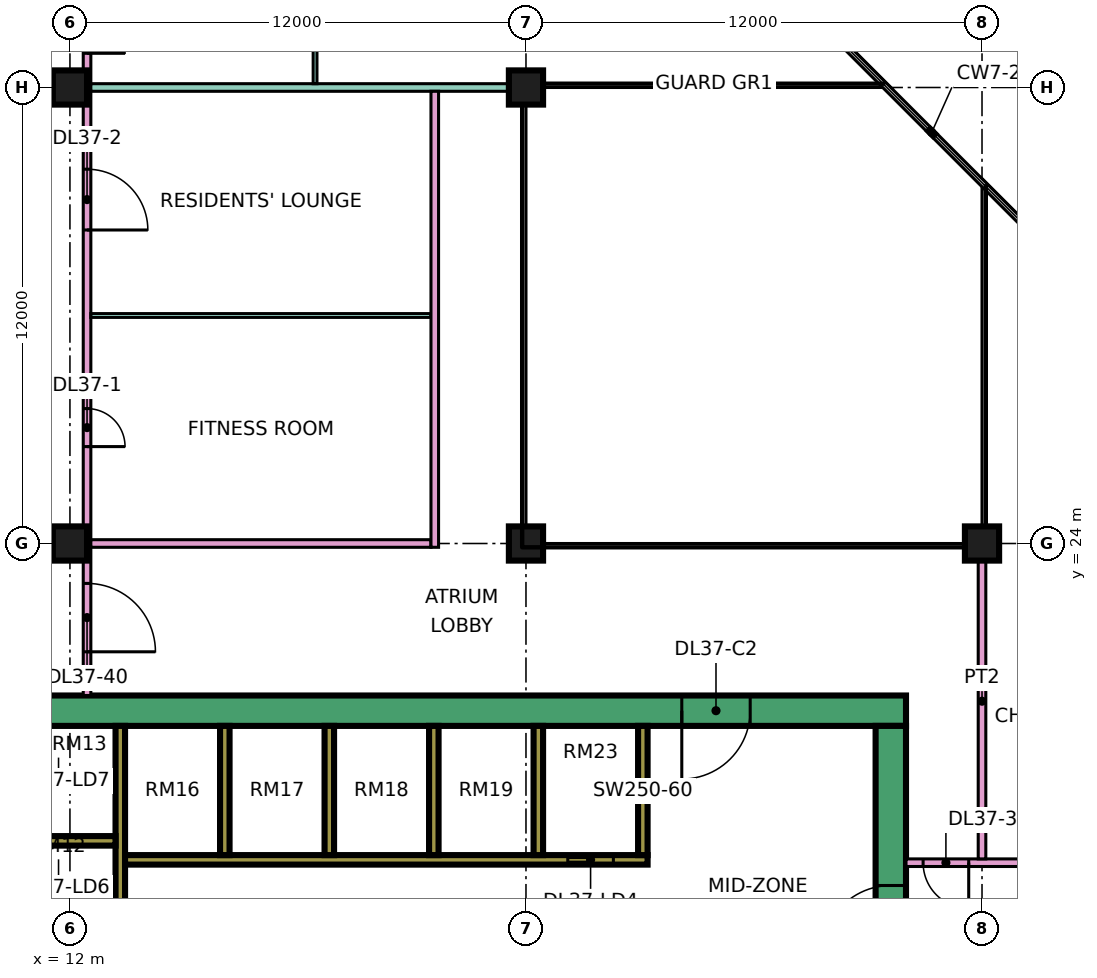
"""IFC4 building model, lengths in metres.
Left out: names, types, materials, properties, quantities, classifications, styles, units other than length and angle.
Written with IfcOpenShell. Run it as: python <this file> out.ifc"""

import sys

from ifc_helpers import new_model, si_unit, direction, frame, frame_2d, origin, origin_2d, place, context, subcontext, project, spatial, rectangle, extrude, element, fill, save


model = new_model("IFC4")
c1 = context("Model", 3, precision=1e-05, world=origin(), true_north=direction((0.0, 1.0)))
c2 = subcontext(c1, "Body", "Model", "MODEL_VIEW")
j1 = project(units=[si_unit("LENGTHUNIT", "METRE"), si_unit("PLANEANGLEUNIT", "RADIAN")], contexts=[c1])
p1 = place(None, origin())
s1 = spatial("IfcSite", under=j1, at=p1, CompositionType="ELEMENT")
p2 = place(p1, origin())
s2 = spatial("IfcBuilding", under=s1, at=p2, CompositionType="ELEMENT")
p3 = place(p2, frame((0.0, 0.0, 164.9)))
s3 = spatial("IfcBuildingStorey", under=s2, at=p3, CompositionType="ELEMENT", Elevation=164.9)
for number, where, z_axis, x_axis in (
    (1, (12.0, 24.0, 0.0), (0.0, 0.0, 1.0), (1.0, 0.0, 0.0)),
    (2, (12.0, 36.0, 0.0), (0.0, 0.0, 1.0), (1.0, 0.0, 0.0)),
    (3, (24.0, 24.0, 0.0), (0.0, 0.0, 1.0), (1.0, 0.0, 0.0)),
    (4, (24.0, 36.0, 0.0), (0.0, 0.0, 1.0), (1.0, 0.0, 0.0)),
    (5, (36.0, 24.0, 0.0), (0.0, 0.0, 1.0), (1.0, 0.0, 0.0)),
):
    element("IfcColumn", number, at=place(p3, frame(where, z_axis=z_axis, x_axis=x_axis)), inside=s3, PredefinedType="COLUMN", context=c2, shape_type="SweptSolid", body=[
        extrude(rectangle(XDim=0.9, YDim=0.9, at=origin_2d()), origin(), (0.0, 0.0, 1.0), 3.75),
    ])
p4 = place(p3, frame((9.0, 19.6, 0.0), z_axis=(0.0, 0.0, 1.0), x_axis=(1.0, 0.0, 0.0)))
e6 = element("IfcWall", 6, at=p4, inside=s3, PredefinedType="SHEAR", context=c2, shape_type="SweptSolid", body=[
    extrude(rectangle(XDim=25.0, YDim=0.8, at=frame_2d((12.5, 0.0))), origin(), (0.0, 0.0, 1.0), 3.75),
])
p5 = place(p4, frame((19.1, 0.0, 0.0)))
e7 = element("IfcOpeningElement", 7, at=p5, cuts=e6, PredefinedType="OPENING", context=c2, shape_type="SweptSolid", body=[
    extrude(rectangle(XDim=1.8, YDim=2.4, at=frame_2d((0.9, 1.2))), frame((0.0, 0.41, 0.0), z_axis=(0.0, -1.0, 0.0), x_axis=(1.0, 0.0, 0.0)), (0.0, 0.0, 1.0), 0.82),
])
p6 = place(p3, frame((33.6, 7.8, 0.0), z_axis=(0.0, 0.0, 1.0), x_axis=(0.0, 1.0, 0.0)))
e8 = element("IfcWall", 8, at=p6, inside=s3, PredefinedType="SHEAR", context=c2, shape_type="SweptSolid", body=[
    extrude(rectangle(XDim=11.4, YDim=0.8, at=frame_2d((5.7, 0.0))), origin(), (0.0, 0.0, 1.0), 3.75),
])
p7 = place(p6, frame((5.4, 0.0, 0.0)))
e9 = element("IfcOpeningElement", 9, at=p7, cuts=e8, PredefinedType="OPENING", context=c2, shape_type="SweptSolid", body=[
    extrude(rectangle(XDim=1.8, YDim=2.4, at=frame_2d((0.9, 1.2))), frame((0.0, 0.41, 0.0), z_axis=(0.0, -1.0, 0.0), x_axis=(1.0, 0.0, 0.0)), (0.0, 0.0, 1.0), 0.82),
])
p8 = place(p3, frame((13.325, 7.8, 0.0), z_axis=(0.0, 0.0, 1.0), x_axis=(0.0, 1.0, 0.0)))
e10 = element("IfcWall", 10, at=p8, inside=s3, PredefinedType="SHEAR", context=c2, shape_type="SweptSolid", body=[
    extrude(rectangle(XDim=11.4, YDim=0.25, at=frame_2d((5.7, 0.0))), origin(), (0.0, 0.0, 1.0), 3.75),
])
p9 = place(p3, frame((13.45, 15.675, 0.0), z_axis=(0.0, 0.0, 1.0), x_axis=(1.0, 0.0, 0.0)))
e11 = element("IfcWall", 11, at=p9, inside=s3, PredefinedType="SHEAR", context=c2, shape_type="SweptSolid", body=[
    extrude(rectangle(XDim=13.75, YDim=0.25, at=frame_2d((6.875, 0.0))), origin(), (0.0, 0.0, 1.0), 3.75),
])
p10 = place(p9, frame((11.65, 0.0, 0.0)))
e12 = element("IfcOpeningElement", 12, at=p10, cuts=e11, PredefinedType="OPENING", context=c2, shape_type="SweptSolid", body=[
    extrude(rectangle(XDim=1.2, YDim=2.2, at=frame_2d((0.6, 1.1))), frame((0.0, 0.135, 0.0), z_axis=(0.0, -1.0, 0.0), x_axis=(1.0, 0.0, 0.0)), (0.0, 0.0, 1.0), 0.27),
])
p11 = place(p3, frame((10.2, 16.175, 0.0), z_axis=(0.0, 0.0, 1.0), x_axis=(1.0, 0.0, 0.0)))
e13 = element("IfcWall", 13, at=p11, inside=s3, PredefinedType="SHEAR", context=c2, shape_type="SweptSolid", body=[
    extrude(rectangle(XDim=3.0, YDim=0.25, at=frame_2d((1.5, 0.0))), origin(), (0.0, 0.0, 1.0), 3.75),
])
for number, where, z_axis, x_axis in (
    (14, (16.075, 15.8, 0.0), (0.0, 0.0, 1.0), (0.0, 1.0, 0.0)),
    (15, (18.825, 15.8, 0.0), (0.0, 0.0, 1.0), (0.0, 1.0, 0.0)),
    (16, (21.575, 15.8, 0.0), (0.0, 0.0, 1.0), (0.0, 1.0, 0.0)),
    (17, (24.325, 15.8, 0.0), (0.0, 0.0, 1.0), (0.0, 1.0, 0.0)),
    (18, (27.075, 15.8, 0.0), (0.0, 0.0, 1.0), (0.0, 1.0, 0.0)),
):
    element("IfcWall", number, at=place(p3, frame(where, z_axis=z_axis, x_axis=x_axis)), inside=s3, PredefinedType="SHEAR", context=c2, shape_type="SweptSolid", body=[
        extrude(rectangle(XDim=3.4, YDim=0.25, at=frame_2d((1.7, 0.0))), origin(), (0.0, 0.0, 1.0), 3.75),
    ])
p12 = place(p3, frame((12.45, 20.0, 0.0), z_axis=(0.0, 0.0, 1.0), x_axis=(0.0, 1.0, 0.0)))
e19 = element("IfcWall", 19, at=p12, inside=s3, PredefinedType="PARTITIONING", context=c2, shape_type="SweptSolid", body=[
    extrude(rectangle(XDim=42.926, YDim=0.2, at=frame_2d((21.463, 0.0))), origin(), (0.0, 0.0, 1.0), 3.35),
])
p13 = place(p12, frame((6.55, 0.0, 0.0)))
e20 = element("IfcOpeningElement", 20, at=p13, cuts=e19, PredefinedType="OPENING", context=c2, shape_type="SweptSolid", body=[
    extrude(rectangle(XDim=1.0, YDim=2.1, at=frame_2d((0.5, 1.05))), frame((0.0, 0.11, 0.0), z_axis=(0.0, -1.0, 0.0), x_axis=(1.0, 0.0, 0.0)), (0.0, 0.0, 1.0), 0.22),
])
p14 = place(p12, frame((12.25, 0.0, 0.0)))
e21 = element("IfcOpeningElement", 21, at=p14, cuts=e19, PredefinedType="OPENING", context=c2, shape_type="SweptSolid", body=[
    extrude(rectangle(XDim=1.6, YDim=2.1, at=frame_2d((0.8, 1.05))), frame((0.0, 0.11, 0.0), z_axis=(0.0, -1.0, 0.0), x_axis=(1.0, 0.0, 0.0)), (0.0, 0.0, 1.0), 0.22),
])
p15 = place(p12, frame((16.9, 0.0, 0.0)))
e22 = element("IfcOpeningElement", 22, at=p15, cuts=e19, PredefinedType="OPENING", context=c2, shape_type="SweptSolid", body=[
    extrude(rectangle(XDim=1.0, YDim=2.1, at=frame_2d((0.5, 1.05))), frame((0.0, 0.11, 0.0), z_axis=(0.0, -1.0, 0.0), x_axis=(1.0, 0.0, 0.0)), (0.0, 0.0, 1.0), 0.22),
])
p16 = place(p12, frame((40.9, 0.0, 0.0)))
e23 = element("IfcOpeningElement", 23, at=p16, cuts=e19, PredefinedType="OPENING", context=c2, shape_type="SweptSolid", body=[
    extrude(rectangle(XDim=1.0, YDim=2.1, at=frame_2d((0.5, 1.05))), frame((0.0, 0.11, 0.0), z_axis=(0.0, -1.0, 0.0), x_axis=(1.0, 0.0, 0.0)), (0.0, 0.0, 1.0), 0.22),
])
p17 = place(p12, frame((1.15, 0.0, 0.0)))
e24 = element("IfcOpeningElement", 24, at=p17, cuts=e19, PredefinedType="OPENING", context=c2, shape_type="SweptSolid", body=[
    extrude(rectangle(XDim=1.8, YDim=2.1, at=frame_2d((0.9, 1.05))), frame((0.0, 0.11, 0.0), z_axis=(0.0, -1.0, 0.0), x_axis=(1.0, 0.0, 0.0)), (0.0, 0.0, 1.0), 0.22),
])
p18 = place(p12, frame((28.6, 0.0, 0.0)))
e25 = element("IfcOpeningElement", 25, at=p18, cuts=e19, PredefinedType="OPENING", context=c2, shape_type="SweptSolid", body=[
    extrude(rectangle(XDim=1.8, YDim=2.1, at=frame_2d((0.9, 1.05))), frame((0.0, 0.11, 0.0), z_axis=(0.0, -1.0, 0.0), x_axis=(1.0, 0.0, 0.0)), (0.0, 0.0, 1.0), 0.22),
])
p19 = place(p3, frame((12.55, 24.0, 0.0), z_axis=(0.0, 0.0, 1.0), x_axis=(1.0, 0.0, 0.0)))
e26 = element("IfcWall", 26, at=p19, inside=s3, PredefinedType="PARTITIONING", context=c2, shape_type="SweptSolid", body=[
    extrude(rectangle(XDim=8.95, YDim=0.2, at=frame_2d((4.475, 0.0))), origin(), (0.0, 0.0, 1.0), 3.35),
])
p20 = place(p3, frame((12.55, 30.0, 0.0), z_axis=(0.0, 0.0, 1.0), x_axis=(1.0, 0.0, 0.0)))
e27 = element("IfcWall", 27, at=p20, inside=s3, PredefinedType="PARTITIONING", context=c2, shape_type="SweptSolid", body=[
    extrude(rectangle(XDim=8.95, YDim=0.1, at=frame_2d((4.475, 0.0))), origin(), (0.0, 0.0, 1.0), 3.35),
])
p21 = place(p3, frame((12.55, 36.0, 0.0), z_axis=(0.0, 0.0, 1.0), x_axis=(1.0, 0.0, 0.0)))
e28 = element("IfcWall", 28, at=p21, inside=s3, PredefinedType="PARTITIONING", context=c2, shape_type="SweptSolid", body=[
    extrude(rectangle(XDim=11.45, YDim=0.2, at=frame_2d((5.725, 0.0))), origin(), (0.0, 0.0, 1.0), 3.35),
])
p22 = place(p3, frame((18.45, 36.1, 0.0), z_axis=(0.0, 0.0, 1.0), x_axis=(0.0, 1.0, 0.0)))
e29 = element("IfcWall", 29, at=p22, inside=s3, PredefinedType="PARTITIONING", context=c2, shape_type="SweptSolid", body=[
    extrude(rectangle(XDim=5.95, YDim=0.1, at=frame_2d((2.975, 0.0))), origin(), (0.0, 0.0, 1.0), 3.35),
])
p23 = place(p22, frame((0.95, 0.0, 0.0)))
e30 = element("IfcOpeningElement", 30, at=p23, cuts=e29, PredefinedType="OPENING", context=c2, shape_type="SweptSolid", body=[
    extrude(rectangle(XDim=0.9, YDim=2.1, at=frame_2d((0.45, 1.05))), frame((0.0, 0.06, 0.0), z_axis=(0.0, -1.0, 0.0), x_axis=(1.0, 0.0, 0.0)), (0.0, 0.0, 1.0), 0.12),
])
p24 = place(p22, frame((3.95, 0.0, 0.0)))
e31 = element("IfcOpeningElement", 31, at=p24, cuts=e29, PredefinedType="OPENING", context=c2, shape_type="SweptSolid", body=[
    extrude(rectangle(XDim=0.9, YDim=2.1, at=frame_2d((0.45, 1.05))), frame((0.0, 0.06, 0.0), z_axis=(0.0, -1.0, 0.0), x_axis=(1.0, 0.0, 0.0)), (0.0, 0.0, 1.0), 0.12),
])
p25 = place(p3, frame((21.6, 23.9, 0.0), z_axis=(0.0, 0.0, 1.0), x_axis=(0.0, 1.0, 0.0)))
e32 = element("IfcWall", 32, at=p25, inside=s3, PredefinedType="PARTITIONING", context=c2, shape_type="SweptSolid", body=[
    extrude(rectangle(XDim=12.0, YDim=0.2, at=frame_2d((6.0, 0.0))), origin(), (0.0, 0.0, 1.0), 3.35),
])
p26 = place(p3, frame((34.0, 15.6, 0.0), z_axis=(0.0, 0.0, 1.0), x_axis=(1.0, 0.0, 0.0)))
e33 = element("IfcWall", 33, at=p26, inside=s3, PredefinedType="PARTITIONING", context=c2, shape_type="SweptSolid", body=[
    extrude(rectangle(XDim=10.35, YDim=0.2, at=frame_2d((5.175, 0.0))), origin(), (0.0, 0.0, 1.0), 3.35),
])
p27 = place(p26, frame((5.6, 0.0, 0.0)))
e34 = element("IfcOpeningElement", 34, at=p27, cuts=e33, PredefinedType="OPENING", context=c2, shape_type="SweptSolid", body=[
    extrude(rectangle(XDim=1.0, YDim=2.1, at=frame_2d((0.5, 1.05))), frame((0.0, 0.11, 0.0), z_axis=(0.0, -1.0, 0.0), x_axis=(1.0, 0.0, 0.0)), (0.0, 0.0, 1.0), 0.22),
])
p28 = place(p26, frame((0.45, 0.0, 0.0)))
e35 = element("IfcOpeningElement", 35, at=p28, cuts=e33, PredefinedType="OPENING", context=c2, shape_type="SweptSolid", body=[
    extrude(rectangle(XDim=1.2, YDim=2.1, at=frame_2d((0.6, 1.05))), frame((0.0, 0.11, 0.0), z_axis=(0.0, -1.0, 0.0), x_axis=(1.0, 0.0, 0.0)), (0.0, 0.0, 1.0), 0.22),
])
p29 = place(p3, frame((36.0, 15.7, 0.0), z_axis=(0.0, 0.0, 1.0), x_axis=(0.0, 1.0, 0.0)))
e36 = element("IfcWall", 36, at=p29, inside=s3, PredefinedType="PARTITIONING", context=c2, shape_type="SweptSolid", body=[
    extrude(rectangle(XDim=8.3, YDim=0.2, at=frame_2d((4.15, 0.0))), origin(), (0.0, 0.0, 1.0), 3.35),
])
p30 = place(p10, origin())
e37 = element("IfcDoor", 37, at=p30, inside=s3, OperationType="DOUBLE_DOOR_SLIDING", PredefinedType="DOOR", context=c2, shape_type="SweptSolid", body=[
    extrude(rectangle(XDim=1.2, YDim=2.2, at=frame_2d((0.6, 1.1))), frame((0.0, 0.025, 0.0), z_axis=(0.0, -1.0, 0.0), x_axis=(1.0, 0.0, 0.0)), (0.0, 0.0, 1.0), 0.05),
])
fill(e12, e37)
p31 = place(p7, origin())
e38 = element("IfcDoor", 38, at=p31, inside=s3, OperationType="DOUBLE_DOOR_SINGLE_SWING", PredefinedType="DOOR", context=c2, shape_type="SweptSolid", body=[
    extrude(rectangle(XDim=1.8, YDim=2.4, at=frame_2d((0.9, 1.2))), frame((0.0, 0.025, 0.0), z_axis=(0.0, -1.0, 0.0), x_axis=(1.0, 0.0, 0.0)), (0.0, 0.0, 1.0), 0.05),
])
fill(e9, e38)
p32 = place(p5, frame((1.8, 0.0, 0.0), z_axis=(0.0, 0.0, 1.0), x_axis=(-1.0, 0.0, 0.0)))
e39 = element("IfcDoor", 39, at=p32, inside=s3, OperationType="DOUBLE_DOOR_SINGLE_SWING", PredefinedType="DOOR", context=c2, shape_type="SweptSolid", body=[
    extrude(rectangle(XDim=1.8, YDim=2.4, at=frame_2d((0.9, 1.2))), frame((0.0, 0.025, 0.0), z_axis=(0.0, -1.0, 0.0), x_axis=(1.0, 0.0, 0.0)), (0.0, 0.0, 1.0), 0.05),
])
fill(e7, e39)
p33 = place(p13, frame((1.0, 0.0, 0.0), z_axis=(0.0, 0.0, 1.0), x_axis=(-1.0, 0.0, 0.0)))
e40 = element("IfcDoor", 40, at=p33, inside=s3, OperationType="SINGLE_SWING_LEFT", PredefinedType="DOOR", context=c2, shape_type="SweptSolid", body=[
    extrude(rectangle(XDim=1.0, YDim=2.1, at=frame_2d((0.5, 1.05))), frame((0.0, 0.025, 0.0), z_axis=(0.0, -1.0, 0.0), x_axis=(1.0, 0.0, 0.0)), (0.0, 0.0, 1.0), 0.05),
])
fill(e20, e40)
p34 = place(p14, frame((1.6, 0.0, 0.0), z_axis=(0.0, 0.0, 1.0), x_axis=(-1.0, 0.0, 0.0)))
e41 = element("IfcDoor", 41, at=p34, inside=s3, OperationType="DOUBLE_DOOR_SINGLE_SWING", PredefinedType="DOOR", context=c2, shape_type="SweptSolid", body=[
    extrude(rectangle(XDim=1.6, YDim=2.1, at=frame_2d((0.8, 1.05))), frame((0.0, 0.025, 0.0), z_axis=(0.0, -1.0, 0.0), x_axis=(1.0, 0.0, 0.0)), (0.0, 0.0, 1.0), 0.05),
])
fill(e21, e41)
p35 = place(p15, frame((1.0, 0.0, 0.0), z_axis=(0.0, 0.0, 1.0), x_axis=(-1.0, 0.0, 0.0)))
e42 = element("IfcDoor", 42, at=p35, inside=s3, OperationType="SINGLE_SWING_LEFT", PredefinedType="DOOR", context=c2, shape_type="SweptSolid", body=[
    extrude(rectangle(XDim=1.0, YDim=2.1, at=frame_2d((0.5, 1.05))), frame((0.0, 0.025, 0.0), z_axis=(0.0, -1.0, 0.0), x_axis=(1.0, 0.0, 0.0)), (0.0, 0.0, 1.0), 0.05),
])
fill(e22, e42)
p36 = place(p28, origin())
e43 = element("IfcDoor", 43, at=p36, inside=s3, OperationType="SINGLE_SWING_RIGHT", PredefinedType="DOOR", context=c2, shape_type="SweptSolid", body=[
    extrude(rectangle(XDim=1.2, YDim=2.1, at=frame_2d((0.6, 1.05))), frame((0.0, 0.025, 0.0), z_axis=(0.0, -1.0, 0.0), x_axis=(1.0, 0.0, 0.0)), (0.0, 0.0, 1.0), 0.05),
])
fill(e35, e43)
p37 = place(p17, frame((1.8, 0.0, 0.0), z_axis=(0.0, 0.0, 1.0), x_axis=(-1.0, 0.0, 0.0)))
e44 = element("IfcDoor", 44, at=p37, inside=s3, OperationType="DOUBLE_DOOR_SINGLE_SWING", PredefinedType="DOOR", context=c2, shape_type="SweptSolid", body=[
    extrude(rectangle(XDim=1.8, YDim=2.1, at=frame_2d((0.9, 1.05))), frame((0.0, 0.025, 0.0), z_axis=(0.0, -1.0, 0.0), x_axis=(1.0, 0.0, 0.0)), (0.0, 0.0, 1.0), 0.05),
])
fill(e24, e44)
save(model, sys.argv[1])
